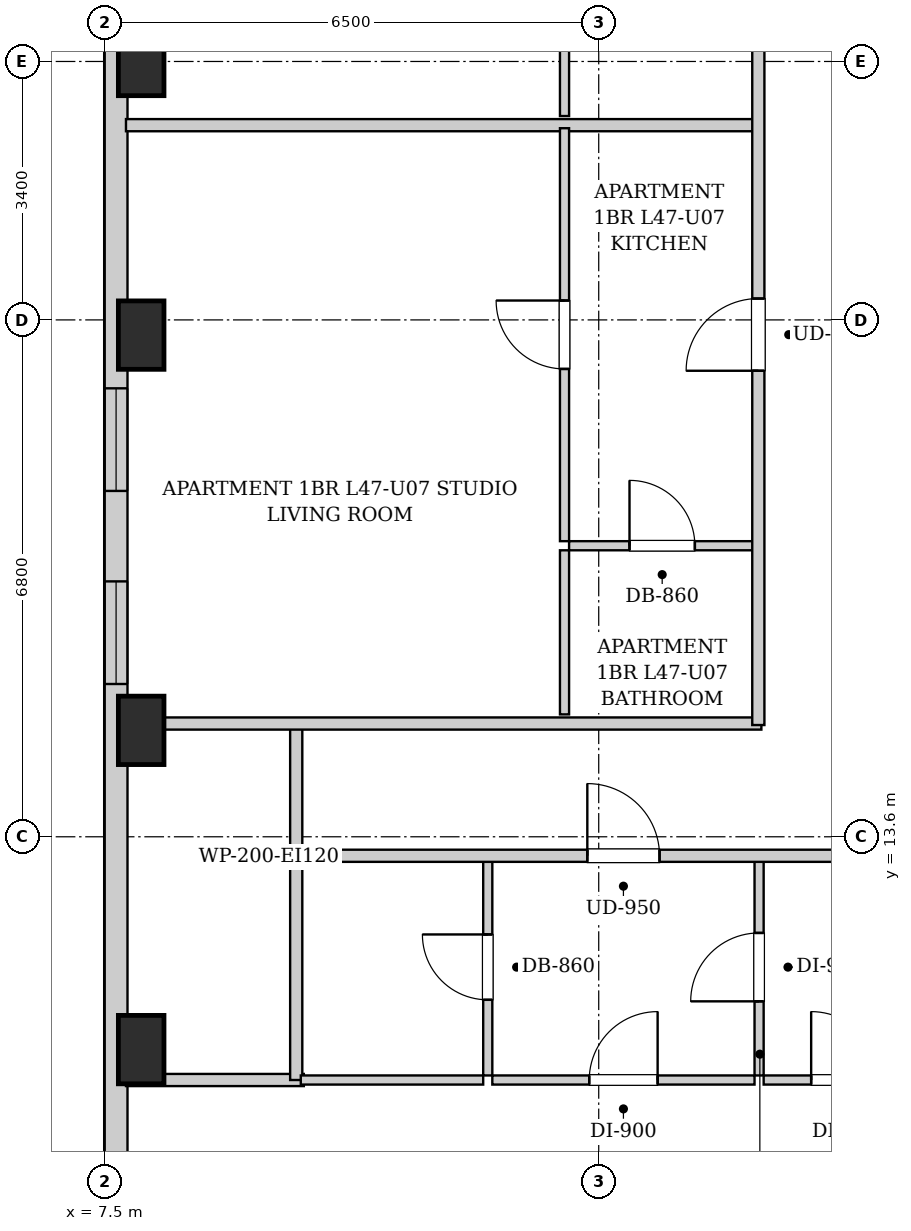
"""IFC4 building model, lengths in metres.
Left out: names, types, materials, properties, quantities, classifications, styles, units other than length and angle.
Written with IfcOpenShell. Run it as: python <this file> out.ifc"""

import sys

from ifc_helpers import new_model, si_unit, direction, frame, frame_2d, origin, origin_2d, place, context, subcontext, project, spatial, rectangle, extrude, element, fill, save


model = new_model("IFC4")
c1 = context("Model", 3, precision=1e-05, world=origin(), true_north=direction((0.0, 1.0)))
c2 = subcontext(c1, "Body", "Model", "MODEL_VIEW")
j1 = project(units=[si_unit("LENGTHUNIT", "METRE"), si_unit("PLANEANGLEUNIT", "RADIAN")], contexts=[c1])
p1 = place(None, origin())
s1 = spatial("IfcSite", under=j1, at=p1, CompositionType="ELEMENT")
p2 = place(p1, origin())
s2 = spatial("IfcBuilding", under=s1, at=p2, CompositionType="ELEMENT")
p3 = place(p2, frame((0.0, 0.0, 163.4)))
s3 = spatial("IfcBuildingStorey", under=s2, at=p3, CompositionType="ELEMENT", Elevation=163.4)
for number, where, z_axis, x_axis in (
    (1, (7.98, 10.8, 0.0), (0.0, 0.0, 1.0), (1.0, 0.0, 0.0)),
    (2, (7.98, 15.0, 0.0), (0.0, 0.0, 1.0), (1.0, 0.0, 0.0)),
    (3, (7.98, 20.2, 0.0), (0.0, 0.0, 1.0), (1.0, 0.0, 0.0)),
    (4, (7.98, 23.8, 0.0), (0.0, 0.0, 1.0), (1.0, 0.0, 0.0)),
):
    element("IfcColumn", number, at=place(p3, frame(where, z_axis=z_axis, x_axis=x_axis)), inside=s3, PredefinedType="COLUMN", context=c2, shape_type="SweptSolid", body=[
        extrude(rectangle(XDim=0.6, YDim=0.9, at=origin_2d()), origin(), (0.0, 0.0, 1.0), 3.25),
    ])
p4 = place(p3, frame((7.65, 6.3, 0.0), z_axis=(0.0, 0.0, 1.0), x_axis=(0.0, 1.0, 0.0)))
e5 = element("IfcWall", 5, at=p4, inside=s3, PredefinedType="SOLIDWALL", context=c2, shape_type="SweptSolid", body=[
    extrude(rectangle(XDim=34.5, YDim=0.3, at=frame_2d((17.25, 0.0))), origin(), (0.0, 0.0, 1.0), 2.99),
])
p5 = place(p4, frame((1.425, 0.0, 0.55)))
e6 = element("IfcOpeningElement", 6, at=p5, cuts=e5, PredefinedType="OPENING", context=c2, shape_type="SweptSolid", body=[
    extrude(rectangle(XDim=1.35, YDim=1.2, at=frame_2d((0.675, 0.6))), frame((0.0, 0.16, 0.0), z_axis=(0.0, -1.0, 0.0), x_axis=(1.0, 0.0, 0.0)), (0.0, 0.0, 1.0), 0.32),
])
p6 = place(p4, frame((30.15, 0.0, 0.55)))
e7 = element("IfcOpeningElement", 7, at=p6, cuts=e5, PredefinedType="OPENING", context=c2, shape_type="SweptSolid", body=[
    extrude(rectangle(XDim=1.35, YDim=1.2, at=frame_2d((0.675, 0.6))), frame((0.0, 0.16, 0.0), z_axis=(0.0, -1.0, 0.0), x_axis=(1.0, 0.0, 0.0)), (0.0, 0.0, 1.0), 0.32),
])
p7 = place(p4, frame((28.31, 0.0, 0.55)))
e8 = element("IfcOpeningElement", 8, at=p7, cuts=e5, PredefinedType="OPENING", context=c2, shape_type="SweptSolid", body=[
    extrude(rectangle(XDim=1.35, YDim=1.2, at=frame_2d((0.675, 0.6))), frame((0.0, 0.16, 0.0), z_axis=(0.0, -1.0, 0.0), x_axis=(1.0, 0.0, 0.0)), (0.0, 0.0, 1.0), 0.32),
])
p8 = place(p4, frame((11.85, 0.0, 0.55)))
e9 = element("IfcOpeningElement", 9, at=p8, cuts=e5, PredefinedType="OPENING", context=c2, shape_type="SweptSolid", body=[
    extrude(rectangle(XDim=1.35, YDim=1.2, at=frame_2d((0.675, 0.6))), frame((0.0, 0.16, 0.0), z_axis=(0.0, -1.0, 0.0), x_axis=(1.0, 0.0, 0.0)), (0.0, 0.0, 1.0), 0.32),
])
p9 = place(p4, frame((9.31, 0.0, 0.55)))
e10 = element("IfcOpeningElement", 10, at=p9, cuts=e5, PredefinedType="OPENING", context=c2, shape_type="SweptSolid", body=[
    extrude(rectangle(XDim=1.35, YDim=1.2, at=frame_2d((0.675, 0.6))), frame((0.0, 0.16, 0.0), z_axis=(0.0, -1.0, 0.0), x_axis=(1.0, 0.0, 0.0)), (0.0, 0.0, 1.0), 0.32),
])
p10 = place(p4, frame((18.975, 0.0, 0.55)))
e11 = element("IfcOpeningElement", 11, at=p10, cuts=e5, PredefinedType="OPENING", context=c2, shape_type="SweptSolid", body=[
    extrude(rectangle(XDim=1.35, YDim=1.2, at=frame_2d((0.675, 0.6))), frame((0.0, 0.16, 0.0), z_axis=(0.0, -1.0, 0.0), x_axis=(1.0, 0.0, 0.0)), (0.0, 0.0, 1.0), 0.32),
])
p11 = place(p4, frame((20.585, 0.0, 0.55)))
e12 = element("IfcOpeningElement", 12, at=p11, cuts=e5, PredefinedType="OPENING", context=c2, shape_type="SweptSolid", body=[
    extrude(rectangle(XDim=1.35, YDim=1.2, at=frame_2d((0.675, 0.6))), frame((0.0, 0.16, 0.0), z_axis=(0.0, -1.0, 0.0), x_axis=(1.0, 0.0, 0.0)), (0.0, 0.0, 1.0), 0.32),
])
p12 = place(p3, frame((10.02, 13.35, 0.0), z_axis=(0.0, 0.0, 1.0), x_axis=(0.0, 1.0, 0.0)))
e13 = element("IfcWall", 13, at=p12, inside=s3, PredefinedType="PARTITIONING", context=c2, shape_type="SweptSolid", body=[
    extrude(rectangle(XDim=1.74, YDim=0.16, at=frame_2d((0.87, 0.0))), origin(), (0.0, 0.0, 1.0), 2.99),
])
p13 = place(p3, frame((7.78, 15.09, 0.0), z_axis=(0.0, 0.0, 1.0), x_axis=(1.0, 0.0, 0.0)))
e14 = element("IfcWall", 14, at=p13, inside=s3, PredefinedType="PARTITIONING", context=c2, shape_type="SweptSolid", body=[
    extrude(rectangle(XDim=8.36, YDim=0.16, at=frame_2d((4.18, 0.0))), origin(), (0.0, 0.0, 1.0), 2.442),
])
p14 = place(p3, frame((7.78, 10.4, 0.0), z_axis=(0.0, 0.0, 1.0), x_axis=(1.0, 0.0, 0.0)))
e15 = element("IfcWall", 15, at=p14, inside=s3, PredefinedType="PARTITIONING", context=c2, shape_type="SweptSolid", body=[
    extrude(rectangle(XDim=2.34, YDim=0.16, at=frame_2d((1.17, 0.0))), origin(), (0.0, 0.0, 1.0), 2.99),
])
p15 = place(p3, frame((10.02, 10.4, 0.0), z_axis=(0.0, 0.0, 1.0), x_axis=(0.0, 1.0, 0.0)))
e16 = element("IfcWall", 16, at=p15, inside=s3, PredefinedType="PARTITIONING", context=c2, shape_type="SweptSolid", body=[
    extrude(rectangle(XDim=2.91, YDim=0.16, at=frame_2d((1.455, 0.0))), origin(), (0.0, 0.0, 1.0), 2.99),
])
p16 = place(p3, frame((12.54, 10.46, 0.0), z_axis=(0.0, 0.0, 1.0), x_axis=(0.0, 1.0, 0.0)))
e17 = element("IfcWall", 17, at=p16, inside=s3, PredefinedType="PARTITIONING", context=c2, shape_type="SweptSolid", body=[
    extrude(rectangle(XDim=2.85, YDim=0.12, at=frame_2d((1.425, 0.0))), origin(), (0.0, 0.0, 1.0), 2.99),
])
p17 = place(p16, frame((0.995, 0.0, 0.0)))
e18 = element("IfcOpeningElement", 18, at=p17, cuts=e17, PredefinedType="OPENING", context=c2, shape_type="SweptSolid", body=[
    extrude(rectangle(XDim=0.86, YDim=2.05, at=frame_2d((0.43, 1.025))), frame((0.0, 0.07, 0.0), z_axis=(0.0, -1.0, 0.0), x_axis=(1.0, 0.0, 0.0)), (0.0, 0.0, 1.0), 0.14),
])
p18 = place(p3, frame((10.08, 10.4, 0.0), z_axis=(0.0, 0.0, 1.0), x_axis=(1.0, 0.0, 0.0)))
e19 = element("IfcWall", 19, at=p18, inside=s3, PredefinedType="PARTITIONING", context=c2, shape_type="SweptSolid", body=[
    extrude(rectangle(XDim=2.4, YDim=0.12, at=frame_2d((1.2, 0.0))), origin(), (0.0, 0.0, 1.0), 2.99),
])
p19 = place(p3, frame((16.11, 10.46, 0.0), z_axis=(0.0, 0.0, 1.0), x_axis=(0.0, 1.0, 0.0)))
e20 = element("IfcWall", 20, at=p19, inside=s3, PredefinedType="PARTITIONING", context=c2, shape_type="SweptSolid", body=[
    extrude(rectangle(XDim=2.85, YDim=0.12, at=frame_2d((1.425, 0.0))), origin(), (0.0, 0.0, 1.0), 2.99),
])
p20 = place(p19, frame((0.975, 0.0, 0.0)))
e21 = element("IfcOpeningElement", 21, at=p20, cuts=e20, PredefinedType="OPENING", context=c2, shape_type="SweptSolid", body=[
    extrude(rectangle(XDim=0.9, YDim=2.05, at=frame_2d((0.45, 1.025))), frame((0.0, 0.07, 0.0), z_axis=(0.0, -1.0, 0.0), x_axis=(1.0, 0.0, 0.0)), (0.0, 0.0, 1.0), 0.14),
])
p21 = place(p3, frame((12.6, 10.4, 0.0), z_axis=(0.0, 0.0, 1.0), x_axis=(1.0, 0.0, 0.0)))
e22 = element("IfcWall", 22, at=p21, inside=s3, PredefinedType="PARTITIONING", context=c2, shape_type="SweptSolid", body=[
    extrude(rectangle(XDim=3.45, YDim=0.12, at=frame_2d((1.725, 0.0))), origin(), (0.0, 0.0, 1.0), 2.99),
])
p22 = place(p21, frame((1.275, 0.0, 0.0)))
e23 = element("IfcOpeningElement", 23, at=p22, cuts=e22, PredefinedType="OPENING", context=c2, shape_type="SweptSolid", body=[
    extrude(rectangle(XDim=0.9, YDim=2.05, at=frame_2d((0.45, 1.025))), frame((0.0, 0.07, 0.0), z_axis=(0.0, -1.0, 0.0), x_axis=(1.0, 0.0, 0.0)), (0.0, 0.0, 1.0), 0.14),
])
p23 = place(p3, frame((16.17, 10.4, 0.0), z_axis=(0.0, 0.0, 1.0), x_axis=(1.0, 0.0, 0.0)))
e24 = element("IfcWall", 24, at=p23, inside=s3, PredefinedType="PARTITIONING", context=c2, shape_type="SweptSolid", body=[
    extrude(rectangle(XDim=2.15, YDim=0.12, at=frame_2d((1.075, 0.0))), origin(), (0.0, 0.0, 1.0), 2.99),
])
p24 = place(p23, frame((0.625, 0.0, 0.0)))
e25 = element("IfcOpeningElement", 25, at=p24, cuts=e24, PredefinedType="OPENING", context=c2, shape_type="SweptSolid", body=[
    extrude(rectangle(XDim=0.9, YDim=2.05, at=frame_2d((0.45, 1.025))), frame((0.0, 0.07, 0.0), z_axis=(0.0, -1.0, 0.0), x_axis=(1.0, 0.0, 0.0)), (0.0, 0.0, 1.0), 0.14),
])
p25 = place(p3, frame((7.78, 22.962, 0.0), z_axis=(0.0, 0.0, 1.0), x_axis=(1.0, 0.0, 0.0)))
e26 = element("IfcWall", 26, at=p25, inside=s3, PredefinedType="PARTITIONING", context=c2, shape_type="SweptSolid", body=[
    extrude(rectangle(XDim=8.28, YDim=0.16, at=frame_2d((4.14, 0.0))), origin(), (0.0, 0.0, 1.0), 2.99),
])
p26 = place(p3, frame((13.61, 17.429, 0.0), z_axis=(0.0, 0.0, 1.0), x_axis=(1.0, 0.0, 0.0)))
e27 = element("IfcWall", 27, at=p26, inside=s3, PredefinedType="PARTITIONING", context=c2, shape_type="SweptSolid", body=[
    extrude(rectangle(XDim=2.45, YDim=0.12, at=frame_2d((1.225, 0.0))), origin(), (0.0, 0.0, 1.0), 2.99),
])
p27 = place(p26, frame((0.795, 0.0, 0.0)))
e28 = element("IfcOpeningElement", 28, at=p27, cuts=e27, PredefinedType="OPENING", context=c2, shape_type="SweptSolid", body=[
    extrude(rectangle(XDim=0.86, YDim=2.05, at=frame_2d((0.43, 1.025))), frame((0.0, 0.07, 0.0), z_axis=(0.0, -1.0, 0.0), x_axis=(1.0, 0.0, 0.0)), (0.0, 0.0, 1.0), 0.14),
])
p28 = place(p3, frame((13.55, 15.21, 0.0), z_axis=(0.0, 0.0, 1.0), x_axis=(0.0, 1.0, 0.0)))
e29 = element("IfcWall", 29, at=p28, inside=s3, PredefinedType="PARTITIONING", context=c2, shape_type="SweptSolid", body=[
    extrude(rectangle(XDim=2.159, YDim=0.12, at=frame_2d((1.08, 0.0))), origin(), (0.0, 0.0, 1.0), 2.99),
])
p29 = place(p3, frame((13.55, 17.489, 0.0), z_axis=(0.0, 0.0, 1.0), x_axis=(0.0, 1.0, 0.0)))
e30 = element("IfcWall", 30, at=p29, inside=s3, PredefinedType="PARTITIONING", context=c2, shape_type="SweptSolid", body=[
    extrude(rectangle(XDim=5.433, YDim=0.12, at=frame_2d((2.717, 0.0))), origin(), (0.0, 0.0, 1.0), 2.99),
])
p30 = place(p29, frame((2.266, 0.0, 0.0)))
e31 = element("IfcOpeningElement", 31, at=p30, cuts=e30, PredefinedType="OPENING", context=c2, shape_type="SweptSolid", body=[
    extrude(rectangle(XDim=0.9, YDim=2.05, at=frame_2d((0.45, 1.025))), frame((0.0, 0.07, 0.0), z_axis=(0.0, -1.0, 0.0), x_axis=(1.0, 0.0, 0.0)), (0.0, 0.0, 1.0), 0.14),
])
p31 = place(p3, frame((13.55, 23.082, 0.0), z_axis=(0.0, 0.0, 1.0), x_axis=(0.0, 1.0, 0.0)))
e32 = element("IfcWall", 32, at=p31, inside=s3, PredefinedType="PARTITIONING", context=c2, shape_type="SweptSolid", body=[
    extrude(rectangle(XDim=1.85, YDim=0.12, at=frame_2d((0.925, 0.0))), origin(), (0.0, 0.0, 1.0), 2.99),
])
p32 = place(p3, frame((10.05, 13.35, 0.0), z_axis=(0.0, 0.0, 1.0), x_axis=(1.0, 0.0, 0.0)))
e33 = element("IfcWall", 33, at=p32, inside=s3, PredefinedType="PARTITIONING", context=c2, shape_type="SweptSolid", body=[
    extrude(rectangle(XDim=27.7, YDim=0.16, at=frame_2d((13.85, 0.0))), origin(), (0.0, 0.0, 1.0), 2.99),
])
p33 = place(p32, frame((3.8, 0.0, 0.0)))
e34 = element("IfcOpeningElement", 34, at=p33, cuts=e33, PredefinedType="OPENING", context=c2, shape_type="SweptSolid", body=[
    extrude(rectangle(XDim=0.95, YDim=2.1, at=frame_2d((0.475, 1.05))), frame((0.0, 0.09, 0.0), z_axis=(0.0, -1.0, 0.0), x_axis=(1.0, 0.0, 0.0)), (0.0, 0.0, 1.0), 0.18),
])
p34 = place(p32, frame((12.695, 0.0, 0.0)))
e35 = element("IfcOpeningElement", 35, at=p34, cuts=e33, PredefinedType="OPENING", context=c2, shape_type="SweptSolid", body=[
    extrude(rectangle(XDim=0.95, YDim=2.1, at=frame_2d((0.475, 1.05))), frame((0.0, 0.09, 0.0), z_axis=(0.0, -1.0, 0.0), x_axis=(1.0, 0.0, 0.0)), (0.0, 0.0, 1.0), 0.18),
])
p35 = place(p3, frame((16.1, 15.07, 0.0), z_axis=(0.0, 0.0, 1.0), x_axis=(0.0, 1.0, 0.0)))
e36 = element("IfcWall", 36, at=p35, inside=s3, PredefinedType="PARTITIONING", context=c2, shape_type="SweptSolid", body=[
    extrude(rectangle(XDim=13.93, YDim=0.16, at=frame_2d((6.965, 0.0))), origin(), (0.0, 0.0, 1.0), 2.99),
])
p36 = place(p35, frame((4.661, 0.0, 0.0)))
e37 = element("IfcOpeningElement", 37, at=p36, cuts=e36, PredefinedType="OPENING", context=c2, shape_type="SweptSolid", body=[
    extrude(rectangle(XDim=0.95, YDim=2.1, at=frame_2d((0.475, 1.05))), frame((0.0, 0.09, 0.0), z_axis=(0.0, -1.0, 0.0), x_axis=(1.0, 0.0, 0.0)), (0.0, 0.0, 1.0), 0.18),
])
p37 = place(p35, frame((11.411, 0.0, 0.0)))
e38 = element("IfcOpeningElement", 38, at=p37, cuts=e36, PredefinedType="OPENING", context=c2, shape_type="SweptSolid", body=[
    extrude(rectangle(XDim=0.95, YDim=2.1, at=frame_2d((0.475, 1.05))), frame((0.0, 0.09, 0.0), z_axis=(0.0, -1.0, 0.0), x_axis=(1.0, 0.0, 0.0)), (0.0, 0.0, 1.0), 0.18),
])
p38 = place(p17, origin())
e39 = element("IfcDoor", 39, at=p38, inside=s3, OperationType="SINGLE_SWING_RIGHT", PredefinedType="DOOR", context=c2, shape_type="SweptSolid", body=[
    extrude(rectangle(XDim=0.86, YDim=2.05, at=frame_2d((0.43, 1.025))), frame((0.0, 0.025, 0.0), z_axis=(0.0, -1.0, 0.0), x_axis=(1.0, 0.0, 0.0)), (0.0, 0.0, 1.0), 0.05),
])
fill(e18, e39)
p39 = place(p20, origin())
e40 = element("IfcDoor", 40, at=p39, inside=s3, OperationType="SINGLE_SWING_LEFT", PredefinedType="DOOR", context=c2, shape_type="SweptSolid", body=[
    extrude(rectangle(XDim=0.9, YDim=2.05, at=frame_2d((0.45, 1.025))), frame((0.0, 0.025, 0.0), z_axis=(0.0, -1.0, 0.0), x_axis=(1.0, 0.0, 0.0)), (0.0, 0.0, 1.0), 0.05),
])
fill(e21, e40)
p40 = place(p22, origin())
e41 = element("IfcDoor", 41, at=p40, inside=s3, OperationType="SINGLE_SWING_RIGHT", PredefinedType="DOOR", context=c2, shape_type="SweptSolid", body=[
    extrude(rectangle(XDim=0.9, YDim=2.05, at=frame_2d((0.45, 1.025))), frame((0.0, 0.025, 0.0), z_axis=(0.0, -1.0, 0.0), x_axis=(1.0, 0.0, 0.0)), (0.0, 0.0, 1.0), 0.05),
])
fill(e23, e41)
p41 = place(p24, origin())
e42 = element("IfcDoor", 42, at=p41, inside=s3, OperationType="SINGLE_SWING_LEFT", PredefinedType="DOOR", context=c2, shape_type="SweptSolid", body=[
    extrude(rectangle(XDim=0.9, YDim=2.05, at=frame_2d((0.45, 1.025))), frame((0.0, 0.025, 0.0), z_axis=(0.0, -1.0, 0.0), x_axis=(1.0, 0.0, 0.0)), (0.0, 0.0, 1.0), 0.05),
])
fill(e25, e42)
p42 = place(p27, origin())
e43 = element("IfcDoor", 43, at=p42, inside=s3, OperationType="SINGLE_SWING_LEFT", PredefinedType="DOOR", context=c2, shape_type="SweptSolid", body=[
    extrude(rectangle(XDim=0.86, YDim=2.05, at=frame_2d((0.43, 1.025))), frame((0.0, 0.025, 0.0), z_axis=(0.0, -1.0, 0.0), x_axis=(1.0, 0.0, 0.0)), (0.0, 0.0, 1.0), 0.05),
])
fill(e28, e43)
p43 = place(p30, origin())
e44 = element("IfcDoor", 44, at=p43, inside=s3, OperationType="SINGLE_SWING_RIGHT", PredefinedType="DOOR", context=c2, shape_type="SweptSolid", body=[
    extrude(rectangle(XDim=0.9, YDim=2.05, at=frame_2d((0.45, 1.025))), frame((0.0, 0.025, 0.0), z_axis=(0.0, -1.0, 0.0), x_axis=(1.0, 0.0, 0.0)), (0.0, 0.0, 1.0), 0.05),
])
fill(e31, e44)
p44 = place(p33, origin())
e45 = element("IfcDoor", 45, at=p44, inside=s3, OperationType="SINGLE_SWING_LEFT", PredefinedType="DOOR", context=c2, shape_type="SweptSolid", body=[
    extrude(rectangle(XDim=0.95, YDim=2.1, at=frame_2d((0.475, 1.05))), frame((0.0, 0.025, 0.0), z_axis=(0.0, -1.0, 0.0), x_axis=(1.0, 0.0, 0.0)), (0.0, 0.0, 1.0), 0.05),
])
fill(e34, e45)
p45 = place(p36, origin())
e46 = element("IfcDoor", 46, at=p45, inside=s3, OperationType="SINGLE_SWING_LEFT", PredefinedType="DOOR", context=c2, shape_type="SweptSolid", body=[
    extrude(rectangle(XDim=0.95, YDim=2.1, at=frame_2d((0.475, 1.05))), frame((0.0, 0.025, 0.0), z_axis=(0.0, -1.0, 0.0), x_axis=(1.0, 0.0, 0.0)), (0.0, 0.0, 1.0), 0.05),
])
fill(e37, e46)
p46 = place(p8, origin())
e47 = element("IfcWindow", 47, at=p46, inside=s3, PartitioningType="SINGLE_PANEL", PredefinedType="WINDOW", context=c2, shape_type="SweptSolid", body=[
    extrude(rectangle(XDim=1.35, YDim=1.2, at=frame_2d((0.675, 0.6))), frame((0.0, 0.03, 0.0), z_axis=(0.0, -1.0, 0.0), x_axis=(1.0, 0.0, 0.0)), (0.0, 0.0, 1.0), 0.06),
])
fill(e9, e47)
p47 = place(p9, origin())
e48 = element("IfcWindow", 48, at=p47, inside=s3, PartitioningType="SINGLE_PANEL", PredefinedType="WINDOW", context=c2, shape_type="SweptSolid", body=[
    extrude(rectangle(XDim=1.35, YDim=1.2, at=frame_2d((0.675, 0.6))), frame((0.0, 0.03, 0.0), z_axis=(0.0, -1.0, 0.0), x_axis=(1.0, 0.0, 0.0)), (0.0, 0.0, 1.0), 0.06),
])
fill(e10, e48)
save(model, sys.argv[1])
